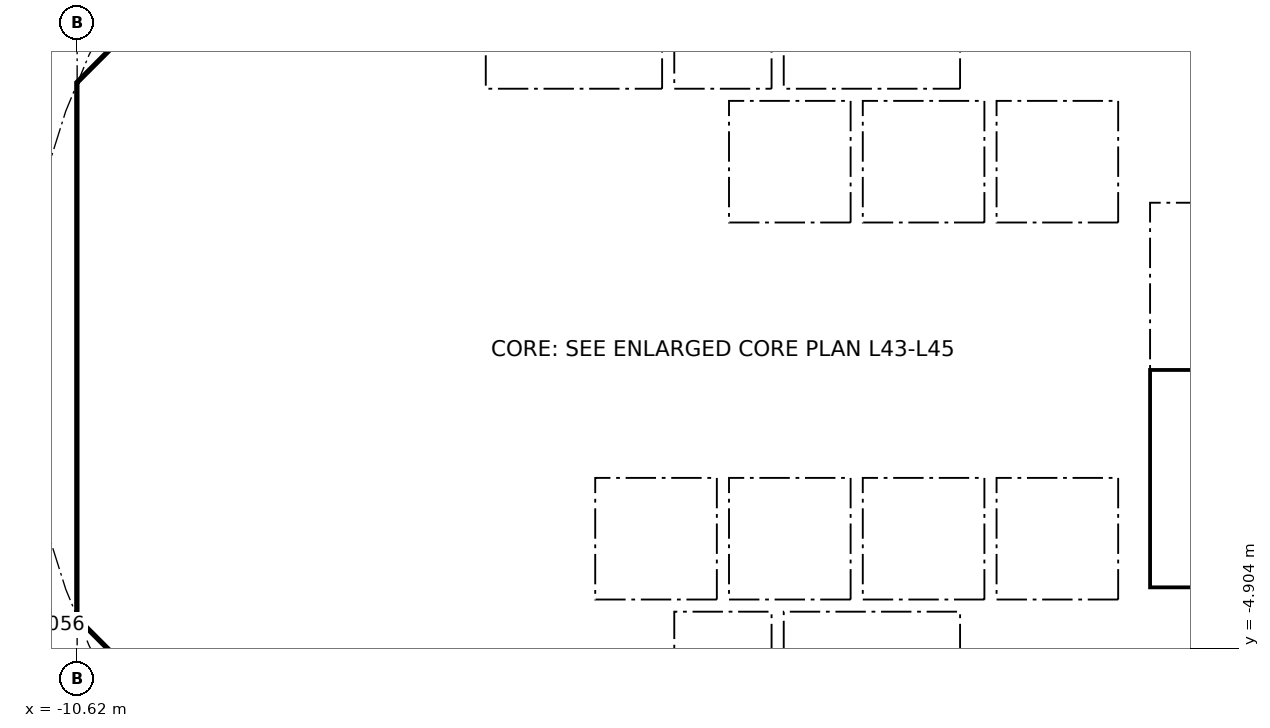
"""IFC4 building model, lengths in metres.
Left out: names, types, materials, properties, quantities, classifications, styles, units other than length and angle.
Written with IfcOpenShell. Run it as: python <this file> out.ifc"""

import sys

from ifc_helpers import new_model, si_unit, direction, frame, frame_2d, origin, place, context, subcontext, project, spatial, polyline, rectangle, outline, extrude, element, fill, save


model = new_model("IFC4")
c1 = context("Model", 3, precision=1e-05, world=origin(), true_north=direction((0.0, 1.0)))
c2 = subcontext(c1, "Body", "Model", "MODEL_VIEW")
j1 = project(units=[si_unit("LENGTHUNIT", "METRE"), si_unit("PLANEANGLEUNIT", "RADIAN")], contexts=[c1])
p1 = place(None, origin())
s1 = spatial("IfcSite", under=j1, at=p1, CompositionType="ELEMENT")
p2 = place(p1, origin())
s2 = spatial("IfcBuilding", under=s1, at=p2, CompositionType="ELEMENT")
p3 = place(p2, frame((0.0, 0.0, 173.3)))
s3 = spatial("IfcBuildingStorey", under=s2, at=p3, CompositionType="ELEMENT", Elevation=173.3)
p4 = place(p3, frame((9.988, 4.613, 0.0), z_axis=(0.0, 0.0, 1.0), x_axis=(-0.707106781187, 0.707106781187, 0.0)))
e1 = element("IfcWall", 1, at=p4, inside=s3, PredefinedType="SHEAR", context=c2, shape_type="SweptSolid", body=[
    extrude(rectangle(XDim=7.602, YDim=0.6, at=frame_2d((3.801, 0.0))), origin(), (0.0, 0.0, 1.0), 3.44),
])
p5 = place(p4, frame((3.201, 0.0, 0.0)))
e2 = element("IfcOpeningElement", 2, at=p5, cuts=e1, PredefinedType="OPENING", context=c2, shape_type="SweptSolid", body=[
    extrude(rectangle(XDim=1.2, YDim=2.1, at=frame_2d((0.6, 1.05))), frame((0.0, 0.31, 0.0), z_axis=(0.0, -1.0, 0.0), x_axis=(1.0, 0.0, 0.0)), (0.0, 0.0, 1.0), 0.62),
])
p6 = place(p3, frame((-4.613, 9.988, 0.0), z_axis=(0.0, 0.0, 1.0), x_axis=(-0.707106781187, -0.707106781187, 0.0)))
e3 = element("IfcWall", 3, at=p6, inside=s3, PredefinedType="SHEAR", context=c2, shape_type="SweptSolid", body=[
    extrude(rectangle(XDim=7.602, YDim=0.6, at=frame_2d((3.801, 0.0))), origin(), (0.0, 0.0, 1.0), 3.44),
])
p7 = place(p6, frame((0.351, 0.0, 0.0)))
e4 = element("IfcOpeningElement", 4, at=p7, cuts=e3, PredefinedType="OPENING", context=c2, shape_type="SweptSolid", body=[
    extrude(rectangle(XDim=1.1, YDim=2.1, at=frame_2d((0.55, 1.05))), frame((0.0, 0.31, 0.0), z_axis=(0.0, -1.0, 0.0), x_axis=(1.0, 0.0, 0.0)), (0.0, 0.0, 1.0), 0.62),
])
p8 = place(p3, frame((-10.325, 3.801, 0.0), z_axis=(0.0, 0.0, 1.0), x_axis=(0.0, -1.0, 0.0)))
e5 = element("IfcWall", 5, at=p8, inside=s3, PredefinedType="SHEAR", context=c2, shape_type="SweptSolid", body=[
    extrude(rectangle(XDim=7.602, YDim=0.6, at=frame_2d((3.801, 0.0))), origin(), (0.0, 0.0, 1.0), 3.44),
])
p9 = place(p8, frame((0.651, 0.0, 0.0)))
e6 = element("IfcOpeningElement", 6, at=p9, cuts=e5, PredefinedType="OPENING", context=c2, shape_type="SweptSolid", body=[
    extrude(rectangle(XDim=1.5, YDim=2.1, at=frame_2d((0.75, 1.05))), frame((0.0, 0.31, 0.0), z_axis=(0.0, -1.0, 0.0), x_axis=(1.0, 0.0, 0.0)), (0.0, 0.0, 1.0), 0.62),
])
p10 = place(p8, frame((5.451, 0.0, 0.0)))
e7 = element("IfcOpeningElement", 7, at=p10, cuts=e5, PredefinedType="OPENING", context=c2, shape_type="SweptSolid", body=[
    extrude(rectangle(XDim=1.5, YDim=2.1, at=frame_2d((0.75, 1.05))), frame((0.0, 0.31, 0.0), z_axis=(0.0, -1.0, 0.0), x_axis=(1.0, 0.0, 0.0)), (0.0, 0.0, 1.0), 0.62),
])
p11 = place(p3, frame((-9.988, -4.613, 0.0), z_axis=(0.0, 0.0, 1.0), x_axis=(0.707106781187, -0.707106781187, 0.0)))
e8 = element("IfcWall", 8, at=p11, inside=s3, PredefinedType="SHEAR", context=c2, shape_type="SweptSolid", body=[
    extrude(rectangle(XDim=7.602, YDim=0.6, at=frame_2d((3.801, 0.0))), origin(), (0.0, 0.0, 1.0), 3.44),
])
p12 = place(p11, frame((6.151, 0.0, 0.0)))
e9 = element("IfcOpeningElement", 9, at=p12, cuts=e8, PredefinedType="OPENING", context=c2, shape_type="SweptSolid", body=[
    extrude(rectangle(XDim=1.1, YDim=2.1, at=frame_2d((0.55, 1.05))), frame((0.0, 0.31, 0.0), z_axis=(0.0, -1.0, 0.0), x_axis=(1.0, 0.0, 0.0)), (0.0, 0.0, 1.0), 0.62),
])
p13 = place(p3, frame((4.613, -9.988, 0.0), z_axis=(0.0, 0.0, 1.0), x_axis=(0.707106781187, 0.707106781187, 0.0)))
e10 = element("IfcWall", 10, at=p13, inside=s3, PredefinedType="SHEAR", context=c2, shape_type="SweptSolid", body=[
    extrude(rectangle(XDim=7.602, YDim=0.6, at=frame_2d((3.801, 0.0))), origin(), (0.0, 0.0, 1.0), 3.44),
])
p14 = place(p13, frame((3.201, 0.0, 0.0)))
e11 = element("IfcOpeningElement", 11, at=p14, cuts=e10, PredefinedType="OPENING", context=c2, shape_type="SweptSolid", body=[
    extrude(rectangle(XDim=1.2, YDim=2.1, at=frame_2d((0.6, 1.05))), frame((0.0, 0.31, 0.0), z_axis=(0.0, -1.0, 0.0), x_axis=(1.0, 0.0, 0.0)), (0.0, 0.0, 1.0), 0.62),
])
p15 = place(p3, frame((-5.8, 4.3, 0.0), z_axis=(0.0, 0.0, 1.0), x_axis=(0.0, 1.0, 0.0)))
e12 = element("IfcWall", 12, at=p15, inside=s3, PredefinedType="PARTITIONING", context=c2, shape_type="SweptSolid", body=[
    extrude(rectangle(XDim=3.927, YDim=0.15, at=frame_2d((1.963, 0.0))), origin(), (0.0, 0.0, 1.0), 3.44),
])
p16 = place(p15, frame((0.413, 0.0, 0.0)))
e13 = element("IfcOpeningElement", 13, at=p16, cuts=e12, PredefinedType="OPENING", context=c2, shape_type="SweptSolid", body=[
    extrude(rectangle(XDim=0.9, YDim=2.1, at=frame_2d((0.45, 1.05))), frame((0.0, 0.085, 0.0), z_axis=(0.0, -1.0, 0.0), x_axis=(1.0, 0.0, 0.0)), (0.0, 0.0, 1.0), 0.17),
])
p17 = place(p15, frame((2.489, 0.0, 0.0)))
e14 = element("IfcOpeningElement", 14, at=p17, cuts=e12, PredefinedType="OPENING", context=c2, shape_type="SweptSolid", body=[
    extrude(rectangle(XDim=0.9, YDim=2.1, at=frame_2d((0.45, 1.05))), frame((0.0, 0.085, 0.0), z_axis=(0.0, -1.0, 0.0), x_axis=(1.0, 0.0, 0.0)), (0.0, 0.0, 1.0), 0.17),
])
p18 = place(p3, frame((4.0, 4.3, 0.0), z_axis=(0.0, 0.0, 1.0), x_axis=(0.0, 1.0, 0.0)))
e15 = element("IfcWall", 15, at=p18, inside=s3, PredefinedType="SOLIDWALL", context=c2, shape_type="SweptSolid", body=[
    extrude(rectangle(XDim=2.2, YDim=0.2, at=frame_2d((1.1, 0.0))), origin(), (0.0, 0.0, 1.0), 3.44),
])
p19 = place(p18, frame((0.55, 0.0, 0.0)))
e16 = element("IfcOpeningElement", 16, at=p19, cuts=e15, PredefinedType="OPENING", context=c2, shape_type="SweptSolid", body=[
    extrude(rectangle(XDim=1.1, YDim=2.1, at=frame_2d((0.55, 1.05))), frame((0.0, 0.11, 0.0), z_axis=(0.0, -1.0, 0.0), x_axis=(1.0, 0.0, 0.0)), (0.0, 0.0, 1.0), 0.22),
])
p20 = place(p3, frame((-4.0, 4.3, 0.0), z_axis=(0.0, 0.0, 1.0), x_axis=(0.0, 1.0, 0.0)))
e17 = element("IfcWall", 17, at=p20, inside=s3, PredefinedType="SOLIDWALL", context=c2, shape_type="SweptSolid", body=[
    extrude(rectangle(XDim=2.2, YDim=0.2, at=frame_2d((1.1, 0.0))), origin(), (0.0, 0.0, 1.0), 3.44),
])
p21 = place(p20, frame((0.55, 0.0, 0.0)))
e18 = element("IfcOpeningElement", 18, at=p21, cuts=e17, PredefinedType="OPENING", context=c2, shape_type="SweptSolid", body=[
    extrude(rectangle(XDim=1.1, YDim=2.1, at=frame_2d((0.55, 1.05))), frame((0.0, 0.11, 0.0), z_axis=(0.0, -1.0, 0.0), x_axis=(1.0, 0.0, 0.0)), (0.0, 0.0, 1.0), 0.22),
])
p22 = place(p3, frame((-6.7, 2.0, 0.0), z_axis=(0.0, 0.0, 1.0), x_axis=(1.0, 0.0, 0.0)))
e19 = element("IfcWall", 19, at=p22, inside=s3, PredefinedType="SOLIDWALL", context=c2, shape_type="SweptSolid", body=[
    extrude(rectangle(XDim=13.4, YDim=0.2, at=frame_2d((6.7, 0.0))), origin(), (0.0, 0.0, 1.0), 3.44),
])
p23 = place(p22, frame((7.25, 0.0, 0.0)))
e20 = element("IfcOpeningElement", 20, at=p23, cuts=e19, PredefinedType="OPENING", context=c2, shape_type="SweptSolid", body=[
    extrude(rectangle(XDim=1.1, YDim=2.1, at=frame_2d((0.55, 1.05))), frame((0.0, 0.11, 0.0), z_axis=(0.0, -1.0, 0.0), x_axis=(1.0, 0.0, 0.0)), (0.0, 0.0, 1.0), 0.22),
])
p24 = place(p22, frame((9.45, 0.0, 0.0)))
e21 = element("IfcOpeningElement", 21, at=p24, cuts=e19, PredefinedType="OPENING", context=c2, shape_type="SweptSolid", body=[
    extrude(rectangle(XDim=1.1, YDim=2.1, at=frame_2d((0.55, 1.05))), frame((0.0, 0.11, 0.0), z_axis=(0.0, -1.0, 0.0), x_axis=(1.0, 0.0, 0.0)), (0.0, 0.0, 1.0), 0.22),
])
p25 = place(p22, frame((0.75, 0.0, 0.0)))
e22 = element("IfcOpeningElement", 22, at=p25, cuts=e19, PredefinedType="OPENING", context=c2, shape_type="SweptSolid", body=[
    extrude(rectangle(XDim=0.9, YDim=2.1, at=frame_2d((0.45, 1.05))), frame((0.0, 0.11, 0.0), z_axis=(0.0, -1.0, 0.0), x_axis=(1.0, 0.0, 0.0)), (0.0, 0.0, 1.0), 0.22),
])
p26 = place(p22, frame((4.05, 0.0, 0.0)))
e23 = element("IfcOpeningElement", 23, at=p26, cuts=e19, PredefinedType="OPENING", context=c2, shape_type="SweptSolid", body=[
    extrude(rectangle(XDim=0.9, YDim=2.1, at=frame_2d((0.45, 1.05))), frame((0.0, 0.11, 0.0), z_axis=(0.0, -1.0, 0.0), x_axis=(1.0, 0.0, 0.0)), (0.0, 0.0, 1.0), 0.22),
])
p27 = place(p3, frame((6.7, 4.0, 0.0), z_axis=(0.0, 0.0, 1.0), x_axis=(1.0, 0.0, 0.0)))
e24 = element("IfcWall", 24, at=p27, inside=s3, PredefinedType="SOLIDWALL", context=c2, shape_type="SweptSolid", body=[
    extrude(rectangle(XDim=3.325, YDim=0.2, at=frame_2d((1.662, 0.0))), origin(), (0.0, 0.0, 1.0), 3.44),
])
p28 = place(p27, frame((1.25, 0.0, 0.0)))
e25 = element("IfcOpeningElement", 25, at=p28, cuts=e24, PredefinedType="OPENING", context=c2, shape_type="SweptSolid", body=[
    extrude(rectangle(XDim=1.1, YDim=2.1, at=frame_2d((0.55, 1.05))), frame((0.0, 0.11, 0.0), z_axis=(0.0, -1.0, 0.0), x_axis=(1.0, 0.0, 0.0)), (0.0, 0.0, 1.0), 0.22),
])
p29 = place(p3, frame((-6.2, -7.827, 0.0), z_axis=(0.0, 0.0, 1.0), x_axis=(0.0, 1.0, 0.0)))
e26 = element("IfcWall", 26, at=p29, inside=s3, PredefinedType="PARTITIONING", context=c2, shape_type="SweptSolid", body=[
    extrude(rectangle(XDim=3.527, YDim=0.15, at=frame_2d((1.763, 0.0))), origin(), (0.0, 0.0, 1.0), 3.44),
])
p30 = place(p29, frame((1.276, 0.0, 0.0)))
e27 = element("IfcOpeningElement", 27, at=p30, cuts=e26, PredefinedType="OPENING", context=c2, shape_type="SweptSolid", body=[
    extrude(rectangle(XDim=0.9, YDim=2.1, at=frame_2d((0.45, 1.05))), frame((0.0, 0.085, 0.0), z_axis=(0.0, -1.0, 0.0), x_axis=(1.0, 0.0, 0.0)), (0.0, 0.0, 1.0), 0.17),
])
p31 = place(p3, frame((4.0, -6.5, 0.0), z_axis=(0.0, 0.0, 1.0), x_axis=(0.0, 1.0, 0.0)))
e28 = element("IfcWall", 28, at=p31, inside=s3, PredefinedType="SOLIDWALL", context=c2, shape_type="SweptSolid", body=[
    extrude(rectangle(XDim=2.2, YDim=0.2, at=frame_2d((1.1, 0.0))), origin(), (0.0, 0.0, 1.0), 3.44),
])
p32 = place(p31, frame((0.55, 0.0, 0.0)))
e29 = element("IfcOpeningElement", 29, at=p32, cuts=e28, PredefinedType="OPENING", context=c2, shape_type="SweptSolid", body=[
    extrude(rectangle(XDim=1.1, YDim=2.1, at=frame_2d((0.55, 1.05))), frame((0.0, 0.11, 0.0), z_axis=(0.0, -1.0, 0.0), x_axis=(1.0, 0.0, 0.0)), (0.0, 0.0, 1.0), 0.22),
])
p33 = place(p3, frame((-4.0, -6.5, 0.0), z_axis=(0.0, 0.0, 1.0), x_axis=(0.0, 1.0, 0.0)))
e30 = element("IfcWall", 30, at=p33, inside=s3, PredefinedType="SOLIDWALL", context=c2, shape_type="SweptSolid", body=[
    extrude(rectangle(XDim=2.2, YDim=0.2, at=frame_2d((1.1, 0.0))), origin(), (0.0, 0.0, 1.0), 3.44),
])
p34 = place(p33, frame((0.65, 0.0, 0.0)))
e31 = element("IfcOpeningElement", 31, at=p34, cuts=e30, PredefinedType="OPENING", context=c2, shape_type="SweptSolid", body=[
    extrude(rectangle(XDim=0.9, YDim=2.1, at=frame_2d((0.45, 1.05))), frame((0.0, 0.11, 0.0), z_axis=(0.0, -1.0, 0.0), x_axis=(1.0, 0.0, 0.0)), (0.0, 0.0, 1.0), 0.22),
])
p35 = place(p3, frame((-6.7, -2.0, 0.0), z_axis=(0.0, 0.0, 1.0), x_axis=(1.0, 0.0, 0.0)))
e32 = element("IfcWall", 32, at=p35, inside=s3, PredefinedType="SOLIDWALL", context=c2, shape_type="SweptSolid", body=[
    extrude(rectangle(XDim=13.4, YDim=0.2, at=frame_2d((6.7, 0.0))), origin(), (0.0, 0.0, 1.0), 3.44),
])
p36 = place(p35, frame((5.05, 0.0, 0.0)))
e33 = element("IfcOpeningElement", 33, at=p36, cuts=e32, PredefinedType="OPENING", context=c2, shape_type="SweptSolid", body=[
    extrude(rectangle(XDim=1.1, YDim=2.1, at=frame_2d((0.55, 1.05))), frame((0.0, 0.11, 0.0), z_axis=(0.0, -1.0, 0.0), x_axis=(1.0, 0.0, 0.0)), (0.0, 0.0, 1.0), 0.22),
])
p37 = place(p35, frame((7.25, 0.0, 0.0)))
e34 = element("IfcOpeningElement", 34, at=p37, cuts=e32, PredefinedType="OPENING", context=c2, shape_type="SweptSolid", body=[
    extrude(rectangle(XDim=1.1, YDim=2.1, at=frame_2d((0.55, 1.05))), frame((0.0, 0.11, 0.0), z_axis=(0.0, -1.0, 0.0), x_axis=(1.0, 0.0, 0.0)), (0.0, 0.0, 1.0), 0.22),
])
p38 = place(p35, frame((1.85, 0.0, 0.0)))
e35 = element("IfcOpeningElement", 35, at=p38, cuts=e32, PredefinedType="OPENING", context=c2, shape_type="SweptSolid", body=[
    extrude(rectangle(XDim=0.9, YDim=2.1, at=frame_2d((0.45, 1.05))), frame((0.0, 0.11, 0.0), z_axis=(0.0, -1.0, 0.0), x_axis=(1.0, 0.0, 0.0)), (0.0, 0.0, 1.0), 0.22),
])
p39 = place(p3, origin())
e36 = element("IfcWall", 36, at=p39, inside=s3, PredefinedType="SHEAR", context=c2, shape_type="SweptSolid", body=[
    extrude(outline(polyline([(-10.625, -3.801), (-10.025, -3.801), (-10.025, -4.152), (-9.776, -4.401), (-10.2, -4.825), (-10.625, -4.401), (-10.625, -3.801)])), origin(), (0.0, 0.0, 1.0), 3.44),
])
p40 = place(p3, origin())
e37 = element("IfcWall", 37, at=p40, inside=s3, PredefinedType="SHEAR", context=c2, shape_type="SweptSolid", body=[
    extrude(outline(polyline([(-10.2, 4.825), (-9.776, 4.401), (-10.025, 4.152), (-10.025, 3.801), (-10.625, 3.801), (-10.625, 4.401), (-10.2, 4.825)])), origin(), (0.0, 0.0, 1.0), 3.44),
])
for number, where, z_axis, x_axis in (
    (38, (-10.025, -4.0, 0.0), (0.0, 0.0, 1.0), (1.0, 0.0, 0.0)),
    (39, (-10.025, 4.0, 0.0), (0.0, 0.0, 1.0), (1.0, 0.0, 0.0)),
):
    element("IfcWall", number, at=place(p3, frame(where, z_axis=z_axis, x_axis=x_axis)), inside=s3, PredefinedType="PARTITIONING", context=c2, shape_type="SweptSolid", body=[
        extrude(rectangle(XDim=3.325, YDim=0.2, at=frame_2d((1.662, 0.0))), origin(), (0.0, 0.0, 1.0), 3.44),
    ])
for number, where, z_axis, x_axis in (
    (40, (-0.9, 4.3, 0.0), (0.0, 0.0, 1.0), (0.0, 1.0, 0.0)),
    (41, (0.9, 4.3, 0.0), (0.0, 0.0, 1.0), (0.0, 1.0, 0.0)),
):
    element("IfcWall", number, at=place(p3, frame(where, z_axis=z_axis, x_axis=x_axis)), inside=s3, PredefinedType="SOLIDWALL", context=c2, shape_type="SweptSolid", body=[
        extrude(rectangle(XDim=2.2, YDim=0.2, at=frame_2d((1.1, 0.0))), origin(), (0.0, 0.0, 1.0), 3.44),
    ])
p41 = place(p3, origin())
e42 = element("IfcWall", 42, at=p41, inside=s3, PredefinedType="SOLIDWALL", context=c2, shape_type="SweptSolid", body=[
    extrude(outline(polyline([(-6.7, 4.3), (6.7, 4.3), (6.7, 2.1), (6.5, 2.1), (6.5, 4.1), (4.5, 4.1), (4.5, 2.1), (4.3, 2.1), (4.3, 4.1), (2.3, 4.1), (2.3, 2.1), (2.1, 2.1), (2.1, 4.1), (0.1, 4.1), (0.1, 2.1), (-0.1, 2.1), (-0.1, 4.1), (-4.3, 4.1), (-4.3, 2.1), (-4.5, 2.1), (-4.5, 4.1), (-6.5, 4.1), (-6.5, 2.1), (-6.7, 2.1), (-6.7, 4.3)])), origin(), (0.0, 0.0, 1.0), 3.44),
])
for number, where, z_axis, x_axis in (
    (43, (-0.9, -6.5, 0.0), (0.0, 0.0, 1.0), (0.0, 1.0, 0.0)),
    (44, (0.9, -6.5, 0.0), (0.0, 0.0, 1.0), (0.0, 1.0, 0.0)),
):
    element("IfcWall", number, at=place(p3, frame(where, z_axis=z_axis, x_axis=x_axis)), inside=s3, PredefinedType="SOLIDWALL", context=c2, shape_type="SweptSolid", body=[
        extrude(rectangle(XDim=2.2, YDim=0.2, at=frame_2d((1.1, 0.0))), origin(), (0.0, 0.0, 1.0), 3.44),
    ])
p42 = place(p3, origin())
e45 = element("IfcWall", 45, at=p42, inside=s3, PredefinedType="SOLIDWALL", context=c2, shape_type="SweptSolid", body=[
    extrude(outline(polyline([(-6.7, -2.1), (-6.5, -2.1), (-6.5, -4.1), (-2.3, -4.1), (-2.3, -2.1), (-2.1, -2.1), (-2.1, -4.1), (-0.1, -4.1), (-0.1, -2.1), (0.1, -2.1), (0.1, -4.1), (2.1, -4.1), (2.1, -2.1), (2.3, -2.1), (2.3, -4.1), (4.3, -4.1), (4.3, -2.1), (4.5, -2.1), (4.5, -4.1), (6.5, -4.1), (6.5, -2.1), (6.7, -2.1), (6.7, -4.3), (-6.7, -4.3), (-6.7, -2.1)])), origin(), (0.0, 0.0, 1.0), 3.44),
])
p43 = place(p3, origin())
e46 = element("IfcWall", 46, at=p43, inside=s3, PredefinedType="SOLIDWALL", context=c2, shape_type="SweptSolid", body=[
    extrude(outline(polyline([(7.025, -3.9), (6.7, -3.9), (6.7, 3.9), (7.025, 3.9), (7.025, -3.9)])), origin(), (0.0, 0.0, 1.0), 3.44),
])
p44 = place(p3, origin())
e47 = element("IfcWall", 47, at=p44, inside=s3, PredefinedType="SOLIDWALL", context=c2, shape_type="SweptSolid", body=[
    extrude(outline(polyline([(10.025, -4.1), (6.7, -4.1), (6.7, -3.9), (10.025, -3.9), (10.025, -4.1)])), origin(), (0.0, 0.0, 1.0), 3.44),
])
p45 = place(p23, origin())
e48 = element("IfcDoor", 48, at=p45, inside=s3, OperationType="DOUBLE_DOOR_SLIDING", PredefinedType="DOOR", context=c2, shape_type="SweptSolid", body=[
    extrude(rectangle(XDim=1.1, YDim=2.1, at=frame_2d((0.55, 1.05))), frame((0.0, 0.025, 0.0), z_axis=(0.0, -1.0, 0.0), x_axis=(1.0, 0.0, 0.0)), (0.0, 0.0, 1.0), 0.05),
])
fill(e20, e48)
p46 = place(p24, origin())
e49 = element("IfcDoor", 49, at=p46, inside=s3, OperationType="DOUBLE_DOOR_SLIDING", PredefinedType="DOOR", context=c2, shape_type="SweptSolid", body=[
    extrude(rectangle(XDim=1.1, YDim=2.1, at=frame_2d((0.55, 1.05))), frame((0.0, 0.025, 0.0), z_axis=(0.0, -1.0, 0.0), x_axis=(1.0, 0.0, 0.0)), (0.0, 0.0, 1.0), 0.05),
])
fill(e21, e49)
p47 = place(p36, origin())
e50 = element("IfcDoor", 50, at=p47, inside=s3, OperationType="DOUBLE_DOOR_SLIDING", PredefinedType="DOOR", context=c2, shape_type="SweptSolid", body=[
    extrude(rectangle(XDim=1.1, YDim=2.1, at=frame_2d((0.55, 1.05))), frame((0.0, 0.025, 0.0), z_axis=(0.0, -1.0, 0.0), x_axis=(1.0, 0.0, 0.0)), (0.0, 0.0, 1.0), 0.05),
])
fill(e33, e50)
p48 = place(p37, origin())
e51 = element("IfcDoor", 51, at=p48, inside=s3, OperationType="DOUBLE_DOOR_SLIDING", PredefinedType="DOOR", context=c2, shape_type="SweptSolid", body=[
    extrude(rectangle(XDim=1.1, YDim=2.1, at=frame_2d((0.55, 1.05))), frame((0.0, 0.025, 0.0), z_axis=(0.0, -1.0, 0.0), x_axis=(1.0, 0.0, 0.0)), (0.0, 0.0, 1.0), 0.05),
])
fill(e34, e51)
p49 = place(p19, origin())
e52 = element("IfcDoor", 52, at=p49, inside=s3, OperationType="DOUBLE_DOOR_SLIDING", PredefinedType="DOOR", context=c2, shape_type="SweptSolid", body=[
    extrude(rectangle(XDim=1.1, YDim=2.1, at=frame_2d((0.55, 1.05))), frame((0.0, 0.025, 0.0), z_axis=(0.0, -1.0, 0.0), x_axis=(1.0, 0.0, 0.0)), (0.0, 0.0, 1.0), 0.05),
])
fill(e16, e52)
p50 = place(p32, origin())
e53 = element("IfcDoor", 53, at=p50, inside=s3, OperationType="DOUBLE_DOOR_SLIDING", PredefinedType="DOOR", context=c2, shape_type="SweptSolid", body=[
    extrude(rectangle(XDim=1.1, YDim=2.1, at=frame_2d((0.55, 1.05))), frame((0.0, 0.025, 0.0), z_axis=(0.0, -1.0, 0.0), x_axis=(1.0, 0.0, 0.0)), (0.0, 0.0, 1.0), 0.05),
])
fill(e29, e53)
p51 = place(p21, origin())
e54 = element("IfcDoor", 54, at=p51, inside=s3, OperationType="DOUBLE_DOOR_SLIDING", PredefinedType="DOOR", context=c2, shape_type="SweptSolid", body=[
    extrude(rectangle(XDim=1.1, YDim=2.1, at=frame_2d((0.55, 1.05))), frame((0.0, 0.025, 0.0), z_axis=(0.0, -1.0, 0.0), x_axis=(1.0, 0.0, 0.0)), (0.0, 0.0, 1.0), 0.05),
])
fill(e18, e54)
p52 = place(p16, origin())
e55 = element("IfcDoor", 55, at=p52, inside=s3, OperationType="SINGLE_SWING_LEFT", PredefinedType="DOOR", context=c2, shape_type="SweptSolid", body=[
    extrude(rectangle(XDim=0.9, YDim=2.1, at=frame_2d((0.45, 1.05))), frame((0.0, 0.025, 0.0), z_axis=(0.0, -1.0, 0.0), x_axis=(1.0, 0.0, 0.0)), (0.0, 0.0, 1.0), 0.05),
])
fill(e13, e55)
p53 = place(p25, origin())
e56 = element("IfcDoor", 56, at=p53, inside=s3, OperationType="SINGLE_SWING_RIGHT", PredefinedType="DOOR", context=c2, shape_type="SweptSolid", body=[
    extrude(rectangle(XDim=0.9, YDim=2.1, at=frame_2d((0.45, 1.05))), frame((0.0, 0.025, 0.0), z_axis=(0.0, -1.0, 0.0), x_axis=(1.0, 0.0, 0.0)), (0.0, 0.0, 1.0), 0.05),
])
fill(e22, e56)
p54 = place(p26, origin())
e57 = element("IfcDoor", 57, at=p54, inside=s3, OperationType="SINGLE_SWING_RIGHT", PredefinedType="DOOR", context=c2, shape_type="SweptSolid", body=[
    extrude(rectangle(XDim=0.9, YDim=2.1, at=frame_2d((0.45, 1.05))), frame((0.0, 0.025, 0.0), z_axis=(0.0, -1.0, 0.0), x_axis=(1.0, 0.0, 0.0)), (0.0, 0.0, 1.0), 0.05),
])
fill(e23, e57)
p55 = place(p38, frame((0.9, 0.0, 0.0), x_axis=(-1.0, 0.0, 0.0)))
e58 = element("IfcDoor", 58, at=p55, inside=s3, OperationType="SINGLE_SWING_LEFT", PredefinedType="DOOR", context=c2, shape_type="SweptSolid", body=[
    extrude(rectangle(XDim=0.9, YDim=2.1, at=frame_2d((0.45, 1.05))), frame((0.0, 0.025, 0.0), z_axis=(0.0, -1.0, 0.0), x_axis=(1.0, 0.0, 0.0)), (0.0, 0.0, 1.0), 0.05),
])
fill(e35, e58)
p56 = place(p9, origin())
e59 = element("IfcDoor", 59, at=p56, inside=s3, OperationType="DOUBLE_DOOR_SINGLE_SWING", PredefinedType="DOOR", context=c2, shape_type="SweptSolid", body=[
    extrude(rectangle(XDim=1.5, YDim=2.1, at=frame_2d((0.75, 1.05))), frame((0.0, 0.025, 0.0), z_axis=(0.0, -1.0, 0.0), x_axis=(1.0, 0.0, 0.0)), (0.0, 0.0, 1.0), 0.05),
])
fill(e6, e59)
p57 = place(p10, origin())
e60 = element("IfcDoor", 60, at=p57, inside=s3, OperationType="DOUBLE_DOOR_SINGLE_SWING", PredefinedType="DOOR", context=c2, shape_type="SweptSolid", body=[
    extrude(rectangle(XDim=1.5, YDim=2.1, at=frame_2d((0.75, 1.05))), frame((0.0, 0.025, 0.0), z_axis=(0.0, -1.0, 0.0), x_axis=(1.0, 0.0, 0.0)), (0.0, 0.0, 1.0), 0.05),
])
fill(e7, e60)
save(model, sys.argv[1])
